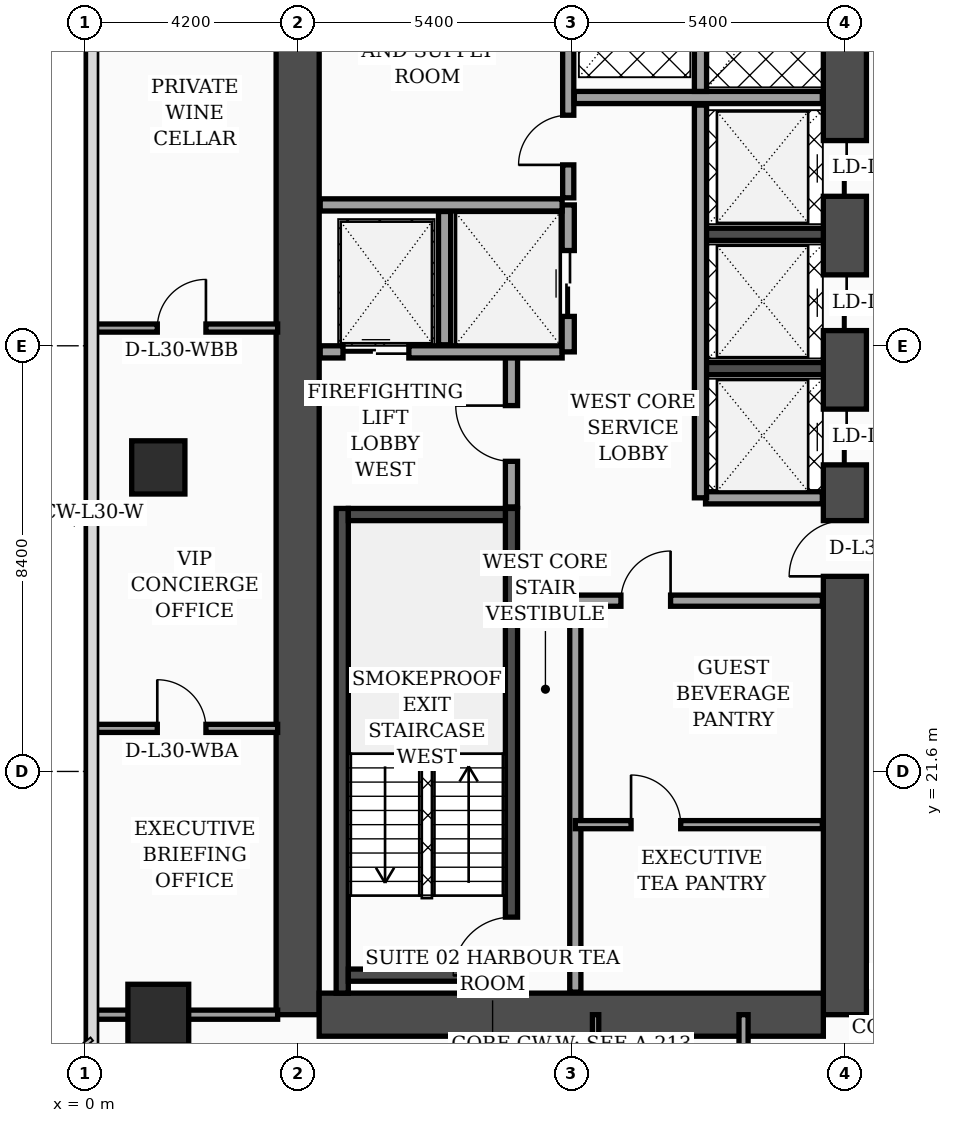
"""IFC4 building model, lengths in metres.
Left out: names, types, materials, properties, quantities, classifications, styles, units other than length and angle.
Written with IfcOpenShell. Run it as: python <this file> out.ifc"""

import sys

from ifc_helpers import new_model, si_unit, direction, frame, frame_2d, origin, origin_2d, place, context, subcontext, project, spatial, rectangle, extrude, element, fill, save


model = new_model("IFC4")
c1 = context("Model", 3, precision=1e-05, world=origin(), true_north=direction((0.0, 1.0)))
c2 = subcontext(c1, "Body", "Model", "MODEL_VIEW")
j1 = project(units=[si_unit("LENGTHUNIT", "METRE"), si_unit("PLANEANGLEUNIT", "RADIAN")], contexts=[c1])
p1 = place(None, origin())
s1 = spatial("IfcSite", under=j1, at=p1, CompositionType="ELEMENT")
p2 = place(p1, origin())
s2 = spatial("IfcBuilding", under=s1, at=p2, CompositionType="ELEMENT")
p3 = place(p2, frame((0.0, 0.0, 124.0)))
s3 = spatial("IfcBuildingStorey", under=s2, at=p3, CompositionType="ELEMENT", Elevation=124.0)
p4 = place(p3, frame((4.2, 16.8, 0.0), z_axis=(0.0, 0.0, 1.0), x_axis=(0.0, 1.0, 0.0)))
e1 = element("IfcWall", 1, at=p4, inside=s3, PredefinedType="SHEAR", context=c2, shape_type="SweptSolid", body=[
    extrude(rectangle(XDim=21.6, YDim=0.85, at=frame_2d((10.8, 0.0))), origin(), (0.0, 0.0, 1.0), 3.56),
])
p5 = place(p3, frame((15.0, 16.8, 0.0), z_axis=(0.0, 0.0, 1.0), x_axis=(0.0, 1.0, 0.0)))
e2 = element("IfcWall", 2, at=p5, inside=s3, PredefinedType="SHEAR", context=c2, shape_type="SweptSolid", body=[
    extrude(rectangle(XDim=21.6, YDim=0.85, at=frame_2d((10.8, 0.0))), origin(), (0.0, 0.0, 1.0), 3.56),
])
p6 = place(p5, frame((8.65, 0.0, 0.0)))
e3 = element("IfcOpeningElement", 3, at=p6, cuts=e2, PredefinedType="OPENING", context=c2, shape_type="SweptSolid", body=[
    extrude(rectangle(XDim=1.1, YDim=2.2, at=frame_2d((0.55, 1.1))), frame((0.0, 0.435, 0.0), z_axis=(0.0, -1.0, 0.0), x_axis=(1.0, 0.0, 0.0)), (0.0, 0.0, 1.0), 0.87),
])
p7 = place(p5, frame((10.85, 0.0, 0.0)))
e4 = element("IfcOpeningElement", 4, at=p7, cuts=e2, PredefinedType="OPENING", context=c2, shape_type="SweptSolid", body=[
    extrude(rectangle(XDim=1.1, YDim=2.2, at=frame_2d((0.55, 1.1))), frame((0.0, 0.435, 0.0), z_axis=(0.0, -1.0, 0.0), x_axis=(1.0, 0.0, 0.0)), (0.0, 0.0, 1.0), 0.87),
])
p8 = place(p5, frame((13.5, 0.0, 0.0)))
e5 = element("IfcOpeningElement", 5, at=p8, cuts=e2, PredefinedType="OPENING", context=c2, shape_type="SweptSolid", body=[
    extrude(rectangle(XDim=1.1, YDim=2.2, at=frame_2d((0.55, 1.1))), frame((0.0, 0.435, 0.0), z_axis=(0.0, -1.0, 0.0), x_axis=(1.0, 0.0, 0.0)), (0.0, 0.0, 1.0), 0.87),
])
p9 = place(p5, frame((16.15, 0.0, 0.0)))
e6 = element("IfcOpeningElement", 6, at=p9, cuts=e2, PredefinedType="OPENING", context=c2, shape_type="SweptSolid", body=[
    extrude(rectangle(XDim=1.1, YDim=2.2, at=frame_2d((0.55, 1.1))), frame((0.0, 0.435, 0.0), z_axis=(0.0, -1.0, 0.0), x_axis=(1.0, 0.0, 0.0)), (0.0, 0.0, 1.0), 0.87),
])
p10 = place(p3, frame((4.625, 16.8, 0.0), z_axis=(0.0, 0.0, 1.0), x_axis=(1.0, 0.0, 0.0)))
e7 = element("IfcWall", 7, at=p10, inside=s3, PredefinedType="SHEAR", context=c2, shape_type="SweptSolid", body=[
    extrude(rectangle(XDim=9.95, YDim=0.85, at=frame_2d((4.975, 0.0))), origin(), (0.0, 0.0, 1.0), 3.56),
])
p11 = place(p3, frame((5.08, 17.225, 0.0), z_axis=(0.0, 0.0, 1.0), x_axis=(0.0, 1.0, 0.0)))
e8 = element("IfcWall", 8, at=p11, inside=s3, PredefinedType="SOLIDWALL", context=c2, shape_type="SweptSolid", body=[
    extrude(rectangle(XDim=9.565, YDim=0.24, at=frame_2d((4.782, 0.0))), origin(), (0.0, 0.0, 1.0), 3.56),
])
p12 = place(p3, frame((8.42, 17.225, 0.0), z_axis=(0.0, 0.0, 1.0), x_axis=(0.0, 1.0, 0.0)))
e9 = element("IfcWall", 9, at=p12, inside=s3, PredefinedType="SOLIDWALL", context=c2, shape_type="SweptSolid", body=[
    extrude(rectangle(XDim=9.565, YDim=0.24, at=frame_2d((4.782, 0.0))), origin(), (0.0, 0.0, 1.0), 3.56),
])
p13 = place(p12, frame((0.35, 0.0, 0.0)))
e10 = element("IfcOpeningElement", 10, at=p13, cuts=e9, PredefinedType="OPENING", context=c2, shape_type="SweptSolid", body=[
    extrude(rectangle(XDim=1.15, YDim=2.2, at=frame_2d((0.575, 1.1))), frame((0.0, 0.13, 0.0), z_axis=(0.0, -1.0, 0.0), x_axis=(1.0, 0.0, 0.0)), (0.0, 0.0, 1.0), 0.26),
])
for number, where, z_axis, x_axis in (
    (11, (5.2, 17.58, 0.0), (0.0, 0.0, 1.0), (1.0, 0.0, 0.0)),
    (12, (5.2, 26.67, 0.0), (0.0, 0.0, 1.0), (1.0, 0.0, 0.0)),
):
    element("IfcWall", number, at=place(p3, frame(where, z_axis=z_axis, x_axis=x_axis)), inside=s3, PredefinedType="SOLIDWALL", context=c2, shape_type="SweptSolid", body=[
        extrude(rectangle(XDim=3.1, YDim=0.24, at=frame_2d((1.55, 0.0))), origin(), (0.0, 0.0, 1.0), 3.56),
    ])
for number, where, z_axis, x_axis in (
    (13, (12.18, 29.55, 0.0), (0.0, 0.0, 1.0), (1.0, 0.0, 0.0)),
    (14, (12.18, 32.2, 0.0), (0.0, 0.0, 1.0), (1.0, 0.0, 0.0)),
):
    element("IfcWall", number, at=place(p3, frame(where, z_axis=z_axis, x_axis=x_axis)), inside=s3, PredefinedType="SOLIDWALL", context=c2, shape_type="SweptSolid", body=[
        extrude(rectangle(XDim=2.395, YDim=0.24, at=frame_2d((1.198, 0.0))), origin(), (0.0, 0.0, 1.0), 3.56),
    ])
p14 = place(p3, frame((1.45, 16.8, 0.0), z_axis=(0.0, 0.0, 1.0), x_axis=(1.0, 0.0, 0.0)))
e15 = element("IfcColumn", 15, at=p14, inside=s3, PredefinedType="COLUMN", context=c2, shape_type="SweptSolid", body=[
    extrude(rectangle(XDim=1.2, YDim=1.2, at=origin_2d()), origin(), (0.0, 0.0, 1.0), 3.56),
])
p15 = place(p3, frame((1.45, 27.6, 0.0), z_axis=(0.0, 0.0, 1.0), x_axis=(1.0, 0.0, 0.0)))
e16 = element("IfcColumn", 16, at=p15, inside=s3, PredefinedType="COLUMN", context=c2, shape_type="SweptSolid", body=[
    extrude(rectangle(XDim=1.05, YDim=1.05, at=origin_2d()), origin(), (0.0, 0.0, 1.0), 3.56),
])
p16 = place(p3, frame((8.42, 26.82, 0.0), z_axis=(0.0, 0.0, 1.0), x_axis=(0.0, 1.0, 0.0)))
e17 = element("IfcWall", 17, at=p16, inside=s3, PredefinedType="SOLIDWALL", context=c2, shape_type="SweptSolid", body=[
    extrude(rectangle(XDim=3.0, YDim=0.24, at=frame_2d((1.5, 0.0))), origin(), (0.0, 0.0, 1.0), 3.56),
])
p17 = place(p16, frame((0.9, 0.0, 0.0)))
e18 = element("IfcOpeningElement", 18, at=p17, cuts=e17, PredefinedType="OPENING", context=c2, shape_type="SweptSolid", body=[
    extrude(rectangle(XDim=1.1, YDim=2.2, at=frame_2d((0.55, 1.1))), frame((0.0, 0.13, 0.0), z_axis=(0.0, -1.0, 0.0), x_axis=(1.0, 0.0, 0.0)), (0.0, 0.0, 1.0), 0.26),
])
p18 = place(p3, frame((4.645, 29.88, 0.0), z_axis=(0.0, 0.0, 1.0), x_axis=(1.0, 0.0, 0.0)))
e19 = element("IfcWall", 19, at=p18, inside=s3, PredefinedType="SOLIDWALL", context=c2, shape_type="SweptSolid", body=[
    extrude(rectangle(XDim=4.775, YDim=0.24, at=frame_2d((2.387, 0.0))), origin(), (0.0, 0.0, 1.0), 3.56),
])
p19 = place(p18, frame((0.45, 0.0, 0.0)))
e20 = element("IfcOpeningElement", 20, at=p19, cuts=e19, PredefinedType="OPENING", context=c2, shape_type="SweptSolid", body=[
    extrude(rectangle(XDim=1.3, YDim=2.35, at=frame_2d((0.65, 1.175))), frame((0.0, 0.13, 0.0), z_axis=(0.0, -1.0, 0.0), x_axis=(1.0, 0.0, 0.0)), (0.0, 0.0, 1.0), 0.26),
])
p20 = place(p3, frame((7.1, 30.02, 0.0), z_axis=(0.0, 0.0, 1.0), x_axis=(0.0, 1.0, 0.0)))
e21 = element("IfcWall", 21, at=p20, inside=s3, PredefinedType="SOLIDWALL", context=c2, shape_type="SweptSolid", body=[
    extrude(rectangle(XDim=2.63, YDim=0.24, at=frame_2d((1.315, 0.0))), origin(), (0.0, 0.0, 1.0), 3.56),
])
p21 = place(p3, frame((9.54, 29.88, 0.0), z_axis=(0.0, 0.0, 1.0), x_axis=(0.0, 1.0, 0.0)))
e22 = element("IfcWall", 22, at=p21, inside=s3, PredefinedType="SOLIDWALL", context=c2, shape_type="SweptSolid", body=[
    extrude(rectangle(XDim=2.9, YDim=0.24, at=frame_2d((1.45, 0.0))), origin(), (0.0, 0.0, 1.0), 3.56),
])
p22 = place(p21, frame((0.7, 0.0, 0.0)))
e23 = element("IfcOpeningElement", 23, at=p22, cuts=e22, PredefinedType="OPENING", context=c2, shape_type="SweptSolid", body=[
    extrude(rectangle(XDim=1.3, YDim=2.35, at=frame_2d((0.65, 1.175))), frame((0.0, 0.13, 0.0), z_axis=(0.0, -1.0, 0.0), x_axis=(1.0, 0.0, 0.0)), (0.0, 0.0, 1.0), 0.26),
])
p23 = place(p3, frame((4.645, 32.78, 0.0), z_axis=(0.0, 0.0, 1.0), x_axis=(1.0, 0.0, 0.0)))
e24 = element("IfcWall", 24, at=p23, inside=s3, PredefinedType="SOLIDWALL", context=c2, shape_type="SweptSolid", body=[
    extrude(rectangle(XDim=4.775, YDim=0.24, at=frame_2d((2.387, 0.0))), origin(), (0.0, 0.0, 1.0), 3.19),
])
p24 = place(p3, frame((9.68, 17.245, 0.0), z_axis=(0.0, 0.0, 1.0), x_axis=(0.0, 1.0, 0.0)))
e25 = element("IfcWall", 25, at=p24, inside=s3, PredefinedType="SOLIDWALL", context=c2, shape_type="SweptSolid", body=[
    extrude(rectangle(XDim=7.755, YDim=0.22, at=frame_2d((3.877, 0.0))), origin(), (0.0, 0.0, 1.0), 3.56),
])
p25 = place(p3, frame((9.54, 32.92, 0.0), z_axis=(0.0, 0.0, 1.0), x_axis=(0.0, 1.0, 0.0)))
e26 = element("IfcWall", 26, at=p25, inside=s3, PredefinedType="SOLIDWALL", context=c2, shape_type="SweptSolid", body=[
    extrude(rectangle(XDim=5.035, YDim=0.22, at=frame_2d((2.518, 0.0))), origin(), (0.0, 0.0, 1.0), 3.56),
])
p26 = place(p25, frame((0.65, 0.0, 0.0)))
e27 = element("IfcOpeningElement", 27, at=p26, cuts=e26, PredefinedType="OPENING", context=c2, shape_type="SweptSolid", body=[
    extrude(rectangle(XDim=0.98, YDim=2.15, at=frame_2d((0.49, 1.075))), frame((0.0, 0.12, 0.0), z_axis=(0.0, -1.0, 0.0), x_axis=(1.0, 0.0, 0.0)), (0.0, 0.0, 1.0), 0.24),
])
p27 = place(p3, frame((9.68, 20.55, 0.0), z_axis=(0.0, 0.0, 1.0), x_axis=(1.0, 0.0, 0.0)))
e28 = element("IfcWall", 28, at=p27, inside=s3, PredefinedType="PARTITIONING", context=c2, shape_type="SweptSolid", body=[
    extrude(rectangle(XDim=4.875, YDim=0.16, at=frame_2d((2.438, 0.0))), origin(), (0.0, 0.0, 1.0), 3.56),
])
p28 = place(p27, frame((1.1, 0.0, 0.0)))
e29 = element("IfcOpeningElement", 29, at=p28, cuts=e28, PredefinedType="OPENING", context=c2, shape_type="SweptSolid", body=[
    extrude(rectangle(XDim=0.98, YDim=2.15, at=frame_2d((0.49, 1.075))), frame((0.0, 0.09, 0.0), z_axis=(0.0, -1.0, 0.0), x_axis=(1.0, 0.0, 0.0)), (0.0, 0.0, 1.0), 0.18),
])
p29 = place(p3, frame((9.68, 24.97, 0.0), z_axis=(0.0, 0.0, 1.0), x_axis=(1.0, 0.0, 0.0)))
e30 = element("IfcWall", 30, at=p29, inside=s3, PredefinedType="SOLIDWALL", context=c2, shape_type="SweptSolid", body=[
    extrude(rectangle(XDim=4.875, YDim=0.22, at=frame_2d((2.438, 0.0))), origin(), (0.0, 0.0, 1.0), 2.84),
])
p30 = place(p29, frame((0.9, 0.0, 0.0)))
e31 = element("IfcOpeningElement", 31, at=p30, cuts=e30, PredefinedType="OPENING", context=c2, shape_type="SweptSolid", body=[
    extrude(rectangle(XDim=0.98, YDim=2.15, at=frame_2d((0.49, 1.075))), frame((0.0, 0.12, 0.0), z_axis=(0.0, -1.0, 0.0), x_axis=(1.0, 0.0, 0.0)), (0.0, 0.0, 1.0), 0.24),
])
p31 = place(p3, frame((12.25, 27.0, 0.0), z_axis=(0.0, 0.0, 1.0), x_axis=(1.0, 0.0, 0.0)))
e32 = element("IfcWall", 32, at=p31, inside=s3, PredefinedType="SOLIDWALL", context=c2, shape_type="SweptSolid", body=[
    extrude(rectangle(XDim=2.305, YDim=0.24, at=frame_2d((1.152, 0.0))), origin(), (0.0, 0.0, 1.0), 3.56),
])
p32 = place(p3, frame((12.15, 27.0, 0.0), z_axis=(0.0, 0.0, 1.0), x_axis=(0.0, 1.0, 0.0)))
e33 = element("IfcWall", 33, at=p32, inside=s3, PredefinedType="SOLIDWALL", context=c2, shape_type="SweptSolid", body=[
    extrude(rectangle(XDim=7.75, YDim=0.24, at=frame_2d((3.875, 0.0))), origin(), (0.0, 0.0, 1.0), 3.56),
])
p33 = place(p3, frame((9.66, 34.9, 0.0), z_axis=(0.0, 0.0, 1.0), x_axis=(1.0, 0.0, 0.0)))
e34 = element("IfcWall", 34, at=p33, inside=s3, PredefinedType="SOLIDWALL", context=c2, shape_type="SweptSolid", body=[
    extrude(rectangle(XDim=4.895, YDim=0.24, at=frame_2d((2.448, 0.0))), origin(), (0.0, 0.0, 1.0), 3.56),
])
p34 = place(p3, frame((12.15, 35.02, 0.0), z_axis=(0.0, 0.0, 1.0), x_axis=(0.0, 1.0, 0.0)))
e35 = element("IfcWall", 35, at=p34, inside=s3, PredefinedType="SOLIDWALL", context=c2, shape_type="SweptSolid", body=[
    extrude(rectangle(XDim=2.935, YDim=0.24, at=frame_2d((1.468, 0.0))), origin(), (0.0, 0.0, 1.0), 3.56),
])
p35 = place(p3, frame((0.08, 22.45, 0.0), z_axis=(0.0, 0.0, 1.0), x_axis=(1.0, 0.0, 0.0)))
e36 = element("IfcWall", 36, at=p35, inside=s3, PredefinedType="PARTITIONING", context=c2, shape_type="SweptSolid", body=[
    extrude(rectangle(XDim=3.725, YDim=0.16, at=frame_2d((1.862, 0.0))), origin(), (0.0, 0.0, 1.0), 3.04),
])
p36 = place(p35, frame((1.35, 0.0, 0.0)))
e37 = element("IfcOpeningElement", 37, at=p36, cuts=e36, PredefinedType="OPENING", context=c2, shape_type="SweptSolid", body=[
    extrude(rectangle(XDim=0.96, YDim=2.2, at=frame_2d((0.48, 1.1))), frame((0.0, 0.09, 0.0), z_axis=(0.0, -1.0, 0.0), x_axis=(1.0, 0.0, 0.0)), (0.0, 0.0, 1.0), 0.18),
])
p37 = place(p3, frame((0.08, 30.35, 0.0), z_axis=(0.0, 0.0, 1.0), x_axis=(1.0, 0.0, 0.0)))
e38 = element("IfcWall", 38, at=p37, inside=s3, PredefinedType="PARTITIONING", context=c2, shape_type="SweptSolid", body=[
    extrude(rectangle(XDim=3.725, YDim=0.16, at=frame_2d((1.862, 0.0))), origin(), (0.0, 0.0, 1.0), 3.04),
])
p38 = place(p37, frame((1.35, 0.0, 0.0)))
e39 = element("IfcOpeningElement", 39, at=p38, cuts=e38, PredefinedType="OPENING", context=c2, shape_type="SweptSolid", body=[
    extrude(rectangle(XDim=0.96, YDim=2.2, at=frame_2d((0.48, 1.1))), frame((0.0, 0.09, 0.0), z_axis=(0.0, -1.0, 0.0), x_axis=(1.0, 0.0, 0.0)), (0.0, 0.0, 1.0), 0.18),
])
p39 = place(p3, frame((0.08, 16.8, 0.0), z_axis=(0.0, 0.0, 1.0), x_axis=(1.0, 0.0, 0.0)))
e40 = element("IfcWall", 40, at=p39, inside=s3, PredefinedType="PARTITIONING", context=c2, shape_type="SweptSolid", body=[
    extrude(rectangle(XDim=3.725, YDim=0.18, at=frame_2d((1.862, 0.0))), origin(), (0.0, 0.0, 1.0), 2.84),
])
p40 = place(p3, frame((10.08, 14.75, 0.0), z_axis=(0.0, 0.0, 1.0), x_axis=(0.0, 1.0, 0.0)))
e41 = element("IfcWall", 41, at=p40, inside=s3, PredefinedType="PARTITIONING", context=c2, shape_type="SweptSolid", body=[
    extrude(rectangle(XDim=2.05, YDim=0.125, at=frame_2d((1.025, 0.0))), origin(), (0.0, 0.0, 1.0), 3.56),
])
p41 = place(p3, frame((13.0, 2.44, 0.0), z_axis=(0.0, 0.0, 1.0), x_axis=(0.0, 1.0, 0.0)))
e42 = element("IfcWall", 42, at=p41, inside=s3, PredefinedType="PARTITIONING", context=c2, shape_type="SweptSolid", body=[
    extrude(rectangle(XDim=14.36, YDim=0.18, at=frame_2d((7.18, 0.0))), origin(), (0.0, 0.0, 1.0), 2.84),
])
p42 = place(p41, frame((3.01, 0.0, 0.0)))
e43 = element("IfcOpeningElement", 43, at=p42, cuts=e42, PredefinedType="OPENING", context=c2, shape_type="SweptSolid", body=[
    extrude(rectangle(XDim=1.02, YDim=2.2, at=frame_2d((0.51, 1.1))), frame((0.0, 0.1, 0.0), z_axis=(0.0, -1.0, 0.0), x_axis=(1.0, 0.0, 0.0)), (0.0, 0.0, 1.0), 0.2),
])
p43 = place(p41, frame((9.35, 0.0, 0.0)))
e44 = element("IfcOpeningElement", 44, at=p43, cuts=e42, PredefinedType="OPENING", context=c2, shape_type="SweptSolid", body=[
    extrude(rectangle(XDim=1.02, YDim=2.2, at=frame_2d((0.51, 1.1))), frame((0.0, 0.1, 0.0), z_axis=(0.0, -1.0, 0.0), x_axis=(1.0, 0.0, 0.0)), (0.0, 0.0, 1.0), 0.2),
])
p44 = place(p17, origin())
e45 = element("IfcDoor", 45, at=p44, inside=s3, OperationType="SINGLE_SWING_RIGHT", PredefinedType="DOOR", context=c2, shape_type="SweptSolid", body=[
    extrude(rectangle(XDim=1.1, YDim=2.2, at=frame_2d((0.55, 1.1))), frame((0.0, 0.025, 0.0), z_axis=(0.0, -1.0, 0.0), x_axis=(1.0, 0.0, 0.0)), (0.0, 0.0, 1.0), 0.05),
])
fill(e18, e45)
p45 = place(p19, origin())
e46 = element("IfcDoor", 46, at=p45, inside=s3, OperationType="DOUBLE_DOOR_SLIDING", PredefinedType="DOOR", context=c2, shape_type="SweptSolid", body=[
    extrude(rectangle(XDim=1.3, YDim=2.35, at=frame_2d((0.65, 1.175))), frame((0.0, 0.025, 0.0), z_axis=(0.0, -1.0, 0.0), x_axis=(1.0, 0.0, 0.0)), (0.0, 0.0, 1.0), 0.05),
])
fill(e20, e46)
p46 = place(p22, origin())
e47 = element("IfcDoor", 47, at=p46, inside=s3, OperationType="DOUBLE_DOOR_SLIDING", PredefinedType="DOOR", context=c2, shape_type="SweptSolid", body=[
    extrude(rectangle(XDim=1.3, YDim=2.35, at=frame_2d((0.65, 1.175))), frame((0.0, 0.025, 0.0), z_axis=(0.0, -1.0, 0.0), x_axis=(1.0, 0.0, 0.0)), (0.0, 0.0, 1.0), 0.05),
])
fill(e23, e47)
p47 = place(p26, origin())
e48 = element("IfcDoor", 48, at=p47, inside=s3, OperationType="SINGLE_SWING_LEFT", PredefinedType="DOOR", context=c2, shape_type="SweptSolid", body=[
    extrude(rectangle(XDim=0.98, YDim=2.15, at=frame_2d((0.49, 1.075))), frame((0.0, 0.025, 0.0), z_axis=(0.0, -1.0, 0.0), x_axis=(1.0, 0.0, 0.0)), (0.0, 0.0, 1.0), 0.05),
])
fill(e27, e48)
p48 = place(p28, origin())
e49 = element("IfcDoor", 49, at=p48, inside=s3, OperationType="SINGLE_SWING_LEFT", PredefinedType="DOOR", context=c2, shape_type="SweptSolid", body=[
    extrude(rectangle(XDim=0.98, YDim=2.15, at=frame_2d((0.49, 1.075))), frame((0.0, 0.025, 0.0), z_axis=(0.0, -1.0, 0.0), x_axis=(1.0, 0.0, 0.0)), (0.0, 0.0, 1.0), 0.05),
])
fill(e29, e49)
p49 = place(p30, origin())
e50 = element("IfcDoor", 50, at=p49, inside=s3, OperationType="SINGLE_SWING_RIGHT", PredefinedType="DOOR", context=c2, shape_type="SweptSolid", body=[
    extrude(rectangle(XDim=0.98, YDim=2.15, at=frame_2d((0.49, 1.075))), frame((0.0, 0.025, 0.0), z_axis=(0.0, -1.0, 0.0), x_axis=(1.0, 0.0, 0.0)), (0.0, 0.0, 1.0), 0.05),
])
fill(e31, e50)
p50 = place(p36, origin())
e51 = element("IfcDoor", 51, at=p50, inside=s3, OperationType="SINGLE_SWING_LEFT", PredefinedType="DOOR", context=c2, shape_type="SweptSolid", body=[
    extrude(rectangle(XDim=0.96, YDim=2.2, at=frame_2d((0.48, 1.1))), frame((0.0, 0.025, 0.0), z_axis=(0.0, -1.0, 0.0), x_axis=(1.0, 0.0, 0.0)), (0.0, 0.0, 1.0), 0.05),
])
fill(e37, e51)
p51 = place(p38, origin())
e52 = element("IfcDoor", 52, at=p51, inside=s3, OperationType="SINGLE_SWING_RIGHT", PredefinedType="DOOR", context=c2, shape_type="SweptSolid", body=[
    extrude(rectangle(XDim=0.96, YDim=2.2, at=frame_2d((0.48, 1.1))), frame((0.0, 0.025, 0.0), z_axis=(0.0, -1.0, 0.0), x_axis=(1.0, 0.0, 0.0)), (0.0, 0.0, 1.0), 0.05),
])
fill(e39, e52)
p52 = place(p13, origin())
e53 = element("IfcDoor", 53, at=p52, inside=s3, OperationType="SINGLE_SWING_LEFT", PredefinedType="DOOR", context=c2, shape_type="SweptSolid", body=[
    extrude(rectangle(XDim=1.15, YDim=2.2, at=frame_2d((0.575, 1.1))), frame((0.0, 0.025, 0.0), z_axis=(0.0, -1.0, 0.0), x_axis=(1.0, 0.0, 0.0)), (0.0, 0.0, 1.0), 0.05),
])
fill(e10, e53)
p53 = place(p6, origin())
e54 = element("IfcDoor", 54, at=p53, inside=s3, OperationType="SINGLE_SWING_LEFT", PredefinedType="DOOR", context=c2, shape_type="SweptSolid", body=[
    extrude(rectangle(XDim=1.1, YDim=2.2, at=frame_2d((0.55, 1.1))), frame((0.0, 0.025, 0.0), z_axis=(0.0, -1.0, 0.0), x_axis=(1.0, 0.0, 0.0)), (0.0, 0.0, 1.0), 0.05),
])
fill(e3, e54)
p54 = place(p7, origin())
e55 = element("IfcDoor", 55, at=p54, inside=s3, OperationType="DOUBLE_DOOR_SLIDING", PredefinedType="DOOR", context=c2, shape_type="SweptSolid", body=[
    extrude(rectangle(XDim=1.1, YDim=2.2, at=frame_2d((0.55, 1.1))), frame((0.0, 0.025, 0.0), z_axis=(0.0, -1.0, 0.0), x_axis=(1.0, 0.0, 0.0)), (0.0, 0.0, 1.0), 0.05),
])
fill(e4, e55)
p55 = place(p8, origin())
e56 = element("IfcDoor", 56, at=p55, inside=s3, OperationType="DOUBLE_DOOR_SLIDING", PredefinedType="DOOR", context=c2, shape_type="SweptSolid", body=[
    extrude(rectangle(XDim=1.1, YDim=2.2, at=frame_2d((0.55, 1.1))), frame((0.0, 0.025, 0.0), z_axis=(0.0, -1.0, 0.0), x_axis=(1.0, 0.0, 0.0)), (0.0, 0.0, 1.0), 0.05),
])
fill(e5, e56)
p56 = place(p9, origin())
e57 = element("IfcDoor", 57, at=p56, inside=s3, OperationType="DOUBLE_DOOR_SLIDING", PredefinedType="DOOR", context=c2, shape_type="SweptSolid", body=[
    extrude(rectangle(XDim=1.1, YDim=2.2, at=frame_2d((0.55, 1.1))), frame((0.0, 0.025, 0.0), z_axis=(0.0, -1.0, 0.0), x_axis=(1.0, 0.0, 0.0)), (0.0, 0.0, 1.0), 0.05),
])
fill(e6, e57)
save(model, sys.argv[1])
